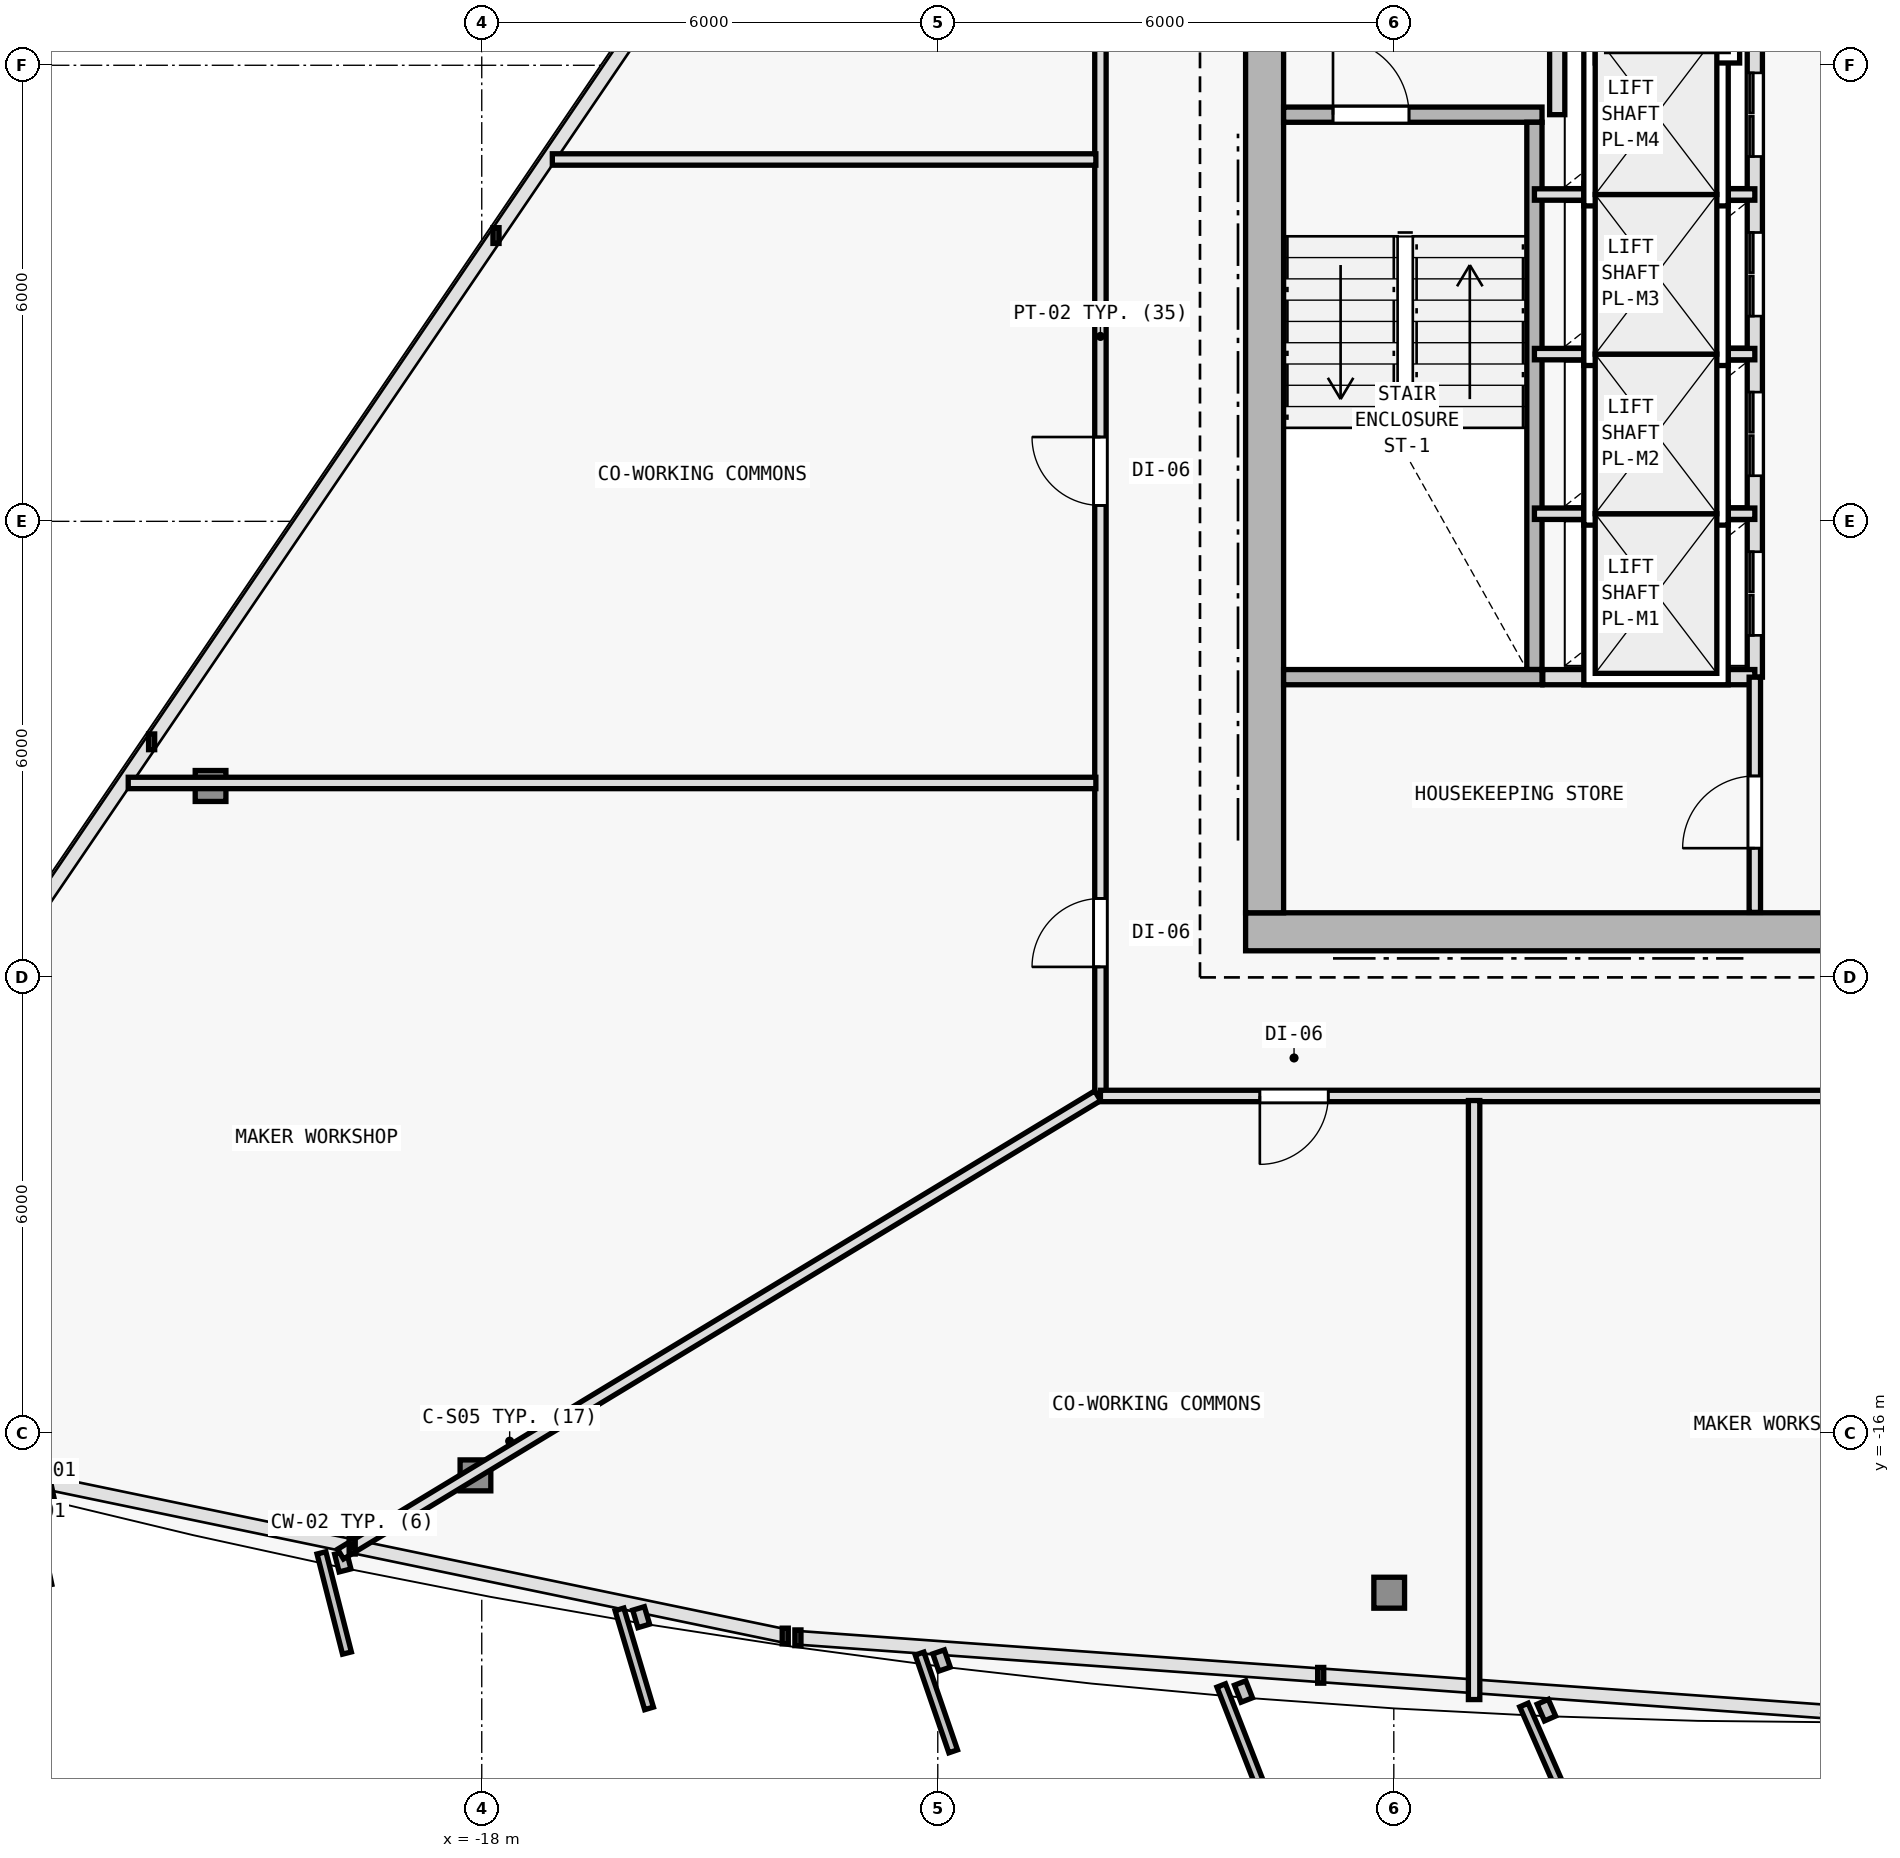
"""IFC4 building model, lengths in metres.
Left out: names, types, materials, properties, quantities, classifications, styles, units other than length and angle.
Written with IfcOpenShell. Run it as: python <this file> out.ifc"""

import sys

from ifc_helpers import new_model, si_unit, direction, frame, frame_2d, origin, origin_2d, place, context, subcontext, project, spatial, rectangle, i_section, extrude, element, fill, save


model = new_model("IFC4")
c1 = context("Model", 3, precision=1e-05, world=origin(), true_north=direction((0.0, 1.0)))
c2 = subcontext(c1, "Body", "Model", "MODEL_VIEW")
j1 = project(units=[si_unit("LENGTHUNIT", "METRE"), si_unit("PLANEANGLEUNIT", "RADIAN")], contexts=[c1])
p1 = place(None, origin())
s1 = spatial("IfcSite", under=j1, at=p1, CompositionType="ELEMENT")
p2 = place(p1, origin())
s2 = spatial("IfcBuilding", under=s1, at=p2, CompositionType="ELEMENT")
p3 = place(p2, frame((0.0, 0.0, 142.2)))
s3 = spatial("IfcBuildingStorey", under=s2, at=p3, CompositionType="ELEMENT", Elevation=142.2)
for number, where, z_axis, x_axis in (
    (1, (-7.7, -9.4, 0.0), (0.0, 0.0, 1.0), (1.0, 0.0, 0.0)),
    (2, (-7.7, 2.0, 0.0), (0.0, 0.0, 1.0), (1.0, 0.0, 0.0)),
):
    element("IfcColumn", number, at=place(p3, frame(where, z_axis=z_axis, x_axis=x_axis)), inside=s3, PredefinedType="COLUMN", context=c2, shape_type="SweptSolid", body=[
        extrude(i_section(OverallWidth=0.404, OverallDepth=0.407, WebThickness=0.017, FlangeThickness=0.028, FilletRadius=0.015, at=origin_2d()), origin(), (0.0, 0.0, 1.0), 3.6),
    ])
p4 = place(p3, frame((-18.083, -16.552, 0.006), z_axis=(0.021139215222, 0.034393707082, 0.999184770947), x_axis=(-0.851947232707, 0.52362764698, 0.0)))
e3 = element("IfcColumn", 3, at=p4, inside=s3, PredefinedType="COLUMN", context=c2, shape_type="SweptSolid", body=[
    extrude(i_section(OverallWidth=0.404, OverallDepth=0.407, WebThickness=0.017, FlangeThickness=0.028, FilletRadius=0.015, at=origin_2d()), origin(), (0.0, 0.0, 1.0), 3.592),
])
p5 = place(p3, frame((-6.061, -18.095, 0.006), z_axis=(0.007137984635, 0.036233769623, 0.999317848892), x_axis=(-0.981142984211, 0.193283327096, 0.0)))
e4 = element("IfcColumn", 4, at=p5, inside=s3, PredefinedType="COLUMN", context=c2, shape_type="SweptSolid", body=[
    extrude(i_section(OverallWidth=0.404, OverallDepth=0.407, WebThickness=0.017, FlangeThickness=0.028, FilletRadius=0.015, at=origin_2d()), origin(), (0.0, 0.0, 1.0), 3.591),
])
p6 = place(p3, frame((-21.568, -7.482, 0.006), z_axis=(0.025971243376, 0.022163940683, 0.999416957156), x_axis=(-0.649149996291, 0.760660425102, 0.0)))
e5 = element("IfcColumn", 5, at=p6, inside=s3, PredefinedType="COLUMN", context=c2, shape_type="SweptSolid", body=[
    extrude(i_section(OverallWidth=0.404, OverallDepth=0.407, WebThickness=0.017, FlangeThickness=0.028, FilletRadius=0.015, at=origin_2d()), origin(), (0.0, 0.0, 1.0), 3.591),
])
p7 = place(p3, frame((-7.95, -9.4, 0.0), z_axis=(0.0, 0.0, 1.0), x_axis=(1.0, 0.0, 0.0)))
e6 = element("IfcWall", 6, at=p7, inside=s3, PredefinedType="SHEAR", context=c2, shape_type="SweptSolid", body=[
    extrude(rectangle(XDim=15.9, YDim=0.5, at=frame_2d((7.95, 0.0))), origin(), (0.0, 0.0, 1.0), 3.35),
])
p8 = place(p7, frame((9.6, 0.0, 0.0)))
e7 = element("IfcOpeningElement", 7, at=p8, cuts=e6, PredefinedType="OPENING", context=c2, shape_type="SweptSolid", body=[
    extrude(rectangle(XDim=1.5, YDim=2.2, at=frame_2d((0.75, 1.1))), frame((0.0, 0.26, 0.0), z_axis=(0.0, -1.0, 0.0), x_axis=(1.0, 0.0, 0.0)), (0.0, 0.0, 1.0), 0.52),
])
p9 = place(p3, frame((-7.7, -9.15, 0.0), z_axis=(0.0, 0.0, 1.0), x_axis=(0.0, 1.0, 0.0)))
e8 = element("IfcWall", 8, at=p9, inside=s3, PredefinedType="SHEAR", context=c2, shape_type="SweptSolid", body=[
    extrude(rectangle(XDim=19.1, YDim=0.5, at=frame_2d((9.55, 0.0))), origin(), (0.0, 0.0, 1.0), 3.35),
])
p10 = place(p9, frame((12.7, 0.0, 0.0)))
e9 = element("IfcOpeningElement", 9, at=p10, cuts=e8, PredefinedType="OPENING", context=c2, shape_type="SweptSolid", body=[
    extrude(rectangle(XDim=1.1, YDim=2.15, at=frame_2d((0.55, 1.075))), frame((0.0, 0.26, 0.0), z_axis=(0.0, -1.0, 0.0), x_axis=(1.0, 0.0, 0.0)), (0.0, 0.0, 1.0), 0.52),
])
p11 = place(p3, frame((-7.45, 1.35, 0.0), z_axis=(0.0, 0.0, 1.0), x_axis=(1.0, 0.0, 0.0)))
e10 = element("IfcWall", 10, at=p11, inside=s3, PredefinedType="SOLIDWALL", context=c2, shape_type="SweptSolid", body=[
    extrude(rectangle(XDim=3.4, YDim=0.2, at=frame_2d((1.7, 0.0))), origin(), (0.0, 0.0, 1.0), 3.35),
])
p12 = place(p11, frame((0.65, 0.0, 0.0)))
e11 = element("IfcOpeningElement", 11, at=p12, cuts=e10, PredefinedType="OPENING", context=c2, shape_type="SweptSolid", body=[
    extrude(rectangle(XDim=1.0, YDim=2.15, at=frame_2d((0.5, 1.075))), frame((0.0, 0.11, 0.0), z_axis=(0.0, -1.0, 0.0), x_axis=(1.0, 0.0, 0.0)), (0.0, 0.0, 1.0), 0.22),
])
p13 = place(p3, frame((-4.15, -5.95, 0.0), z_axis=(0.0, 0.0, 1.0), x_axis=(0.0, 1.0, 0.0)))
e12 = element("IfcWall", 12, at=p13, inside=s3, PredefinedType="SOLIDWALL", context=c2, shape_type="SweptSolid", body=[
    extrude(rectangle(XDim=7.2, YDim=0.2, at=frame_2d((3.6, 0.0))), origin(), (0.0, 0.0, 1.0), 3.35),
])
p14 = place(p3, frame((-3.85, 1.35, 0.0), z_axis=(0.0, 0.0, 1.0), x_axis=(0.0, 1.0, 0.0)))
e13 = element("IfcWall", 13, at=p14, inside=s3, PredefinedType="SOLIDWALL", context=c2, shape_type="SweptSolid", body=[
    extrude(rectangle(XDim=8.595, YDim=0.2, at=frame_2d((4.297, 0.0))), origin(), (0.0, 0.0, 1.0), 3.35),
])
p15 = place(p14, frame((1.5, 0.0, 0.0)))
e14 = element("IfcOpeningElement", 14, at=p15, cuts=e13, PredefinedType="OPENING", context=c2, shape_type="SweptSolid", body=[
    extrude(rectangle(XDim=1.0, YDim=2.15, at=frame_2d((0.5, 1.075))), frame((0.0, 0.11, 0.0), z_axis=(0.0, -1.0, 0.0), x_axis=(1.0, 0.0, 0.0)), (0.0, 0.0, 1.0), 0.22),
])
p16 = place(p14, frame((3.18, 0.0, 0.0)))
e15 = element("IfcOpeningElement", 15, at=p16, cuts=e13, PredefinedType="OPENING", context=c2, shape_type="SweptSolid", body=[
    extrude(rectangle(XDim=1.0, YDim=2.15, at=frame_2d((0.5, 1.075))), frame((0.0, 0.11, 0.0), z_axis=(0.0, -1.0, 0.0), x_axis=(1.0, 0.0, 0.0)), (0.0, 0.0, 1.0), 0.22),
])
p17 = place(p3, frame((-1.25, -6.05, 0.0), z_axis=(0.0, 0.0, 1.0), x_axis=(0.0, 1.0, 0.0)))
e16 = element("IfcWall", 16, at=p17, inside=s3, PredefinedType="SOLIDWALL", context=c2, shape_type="SweptSolid", body=[
    extrude(rectangle(XDim=8.7, YDim=0.2, at=frame_2d((4.35, 0.0))), origin(), (0.0, 0.0, 1.0), 3.35),
])
p18 = place(p17, frame((0.55, 0.0, 0.0)))
e17 = element("IfcOpeningElement", 17, at=p18, cuts=e16, PredefinedType="OPENING", context=c2, shape_type="SweptSolid", body=[
    extrude(rectangle(XDim=1.1, YDim=2.15, at=frame_2d((0.55, 1.075))), frame((0.0, 0.11, 0.0), z_axis=(0.0, -1.0, 0.0), x_axis=(1.0, 0.0, 0.0)), (0.0, 0.0, 1.0), 0.22),
])
p19 = place(p17, frame((2.65, 0.0, 0.0)))
e18 = element("IfcOpeningElement", 18, at=p19, cuts=e16, PredefinedType="OPENING", context=c2, shape_type="SweptSolid", body=[
    extrude(rectangle(XDim=1.1, YDim=2.15, at=frame_2d((0.55, 1.075))), frame((0.0, 0.11, 0.0), z_axis=(0.0, -1.0, 0.0), x_axis=(1.0, 0.0, 0.0)), (0.0, 0.0, 1.0), 0.22),
])
p20 = place(p17, frame((4.75, 0.0, 0.0)))
e19 = element("IfcOpeningElement", 19, at=p20, cuts=e16, PredefinedType="OPENING", context=c2, shape_type="SweptSolid", body=[
    extrude(rectangle(XDim=1.1, YDim=2.15, at=frame_2d((0.55, 1.075))), frame((0.0, 0.11, 0.0), z_axis=(0.0, -1.0, 0.0), x_axis=(1.0, 0.0, 0.0)), (0.0, 0.0, 1.0), 0.22),
])
p21 = place(p17, frame((6.85, 0.0, 0.0)))
e20 = element("IfcOpeningElement", 20, at=p21, cuts=e16, PredefinedType="OPENING", context=c2, shape_type="SweptSolid", body=[
    extrude(rectangle(XDim=1.1, YDim=2.15, at=frame_2d((0.55, 1.075))), frame((0.0, 0.11, 0.0), z_axis=(0.0, -1.0, 0.0), x_axis=(1.0, 0.0, 0.0)), (0.0, 0.0, 1.0), 0.22),
])
for number, where, z_axis, x_axis in (
    (21, (-4.15, -3.9, 0.0), (0.0, 0.0, 1.0), (1.0, 0.0, 0.0)),
    (22, (-4.15, -1.8, 0.0), (0.0, 0.0, 1.0), (1.0, 0.0, 0.0)),
    (23, (-4.15, 0.3, 0.0), (0.0, 0.0, 1.0), (1.0, 0.0, 0.0)),
):
    element("IfcWall", number, at=place(p3, frame(where, z_axis=z_axis, x_axis=x_axis)), inside=s3, PredefinedType="PARTITIONING", context=c2, shape_type="SweptSolid", body=[
        extrude(rectangle(XDim=2.9, YDim=0.15, at=frame_2d((1.45, 0.0))), origin(), (0.0, 0.0, 1.0), 3.35),
    ])
p22 = place(p3, frame((-7.45, -6.05, 0.0), z_axis=(0.0, 0.0, 1.0), x_axis=(1.0, 0.0, 0.0)))
e24 = element("IfcWall", 24, at=p22, inside=s3, PredefinedType="SOLIDWALL", context=c2, shape_type="SweptSolid", body=[
    extrude(rectangle(XDim=3.4, YDim=0.2, at=frame_2d((1.7, 0.0))), origin(), (0.0, 0.0, 1.0), 3.35),
])
p23 = place(p3, frame((-4.04, -6.05, 0.0), z_axis=(0.0, 0.0, 1.0), x_axis=(1.0, 0.0, 0.0)))
e25 = element("IfcWall", 25, at=p23, inside=s3, PredefinedType="SOLIDWALL", context=c2, shape_type="SweptSolid", body=[
    extrude(rectangle(XDim=2.79, YDim=0.2, at=frame_2d((1.395, 0.0))), origin(), (0.0, 0.0, 1.0), 3.35),
])
p24 = place(p3, frame((-1.25, -9.145, 0.0), z_axis=(0.0, 0.0, 1.0), x_axis=(0.0, 1.0, 0.0)))
e26 = element("IfcWall", 26, at=p24, inside=s3, PredefinedType="PARTITIONING", context=c2, shape_type="SweptSolid", body=[
    extrude(rectangle(XDim=3.095, YDim=0.15, at=frame_2d((1.547, 0.0))), origin(), (0.0, 0.0, 1.0), 3.35),
])
p25 = place(p24, frame((0.845, 0.0, 0.0)))
e27 = element("IfcOpeningElement", 27, at=p25, cuts=e26, PredefinedType="OPENING", context=c2, shape_type="SweptSolid", body=[
    extrude(rectangle(XDim=0.95, YDim=2.1, at=frame_2d((0.475, 1.05))), frame((0.0, 0.085, 0.0), z_axis=(0.0, -1.0, 0.0), x_axis=(1.0, 0.0, 0.0)), (0.0, 0.0, 1.0), 0.17),
])
p26 = place(p3, frame((-9.86, -11.56, 0.0), z_axis=(0.0, 0.0, 1.0), x_axis=(0.0, 1.0, 0.0)))
e28 = element("IfcWall", 28, at=p26, inside=s3, PredefinedType="PARTITIONING", context=c2, shape_type="SweptSolid", body=[
    extrude(rectangle(XDim=19.986, YDim=0.15, at=frame_2d((9.993, 0.0))), origin(), (0.0, 0.0, 1.0), 2.775),
])
p27 = place(p26, frame((7.769, 0.0, 0.0)))
e29 = element("IfcOpeningElement", 29, at=p27, cuts=e28, PredefinedType="OPENING", context=c2, shape_type="SweptSolid", body=[
    extrude(rectangle(XDim=0.9, YDim=2.1, at=frame_2d((0.45, 1.05))), frame((0.0, 0.085, 0.0), z_axis=(0.0, -1.0, 0.0), x_axis=(1.0, 0.0, 0.0)), (0.0, 0.0, 1.0), 0.17),
])
p28 = place(p26, frame((1.698, 0.0, 0.0)))
e30 = element("IfcOpeningElement", 30, at=p28, cuts=e28, PredefinedType="OPENING", context=c2, shape_type="SweptSolid", body=[
    extrude(rectangle(XDim=0.9, YDim=2.1, at=frame_2d((0.45, 1.05))), frame((0.0, 0.085, 0.0), z_axis=(0.0, -1.0, 0.0), x_axis=(1.0, 0.0, 0.0)), (0.0, 0.0, 1.0), 0.17),
])
p29 = place(p26, frame((15.614, 0.0, 0.0)))
e31 = element("IfcOpeningElement", 31, at=p29, cuts=e28, PredefinedType="OPENING", context=c2, shape_type="SweptSolid", body=[
    extrude(rectangle(XDim=0.9, YDim=2.1, at=frame_2d((0.45, 1.05))), frame((0.0, 0.085, 0.0), z_axis=(0.0, -1.0, 0.0), x_axis=(1.0, 0.0, 0.0)), (0.0, 0.0, 1.0), 0.17),
])
p30 = place(p3, frame((13.18, -11.56, 0.0), z_axis=(0.0, 0.0, 1.0), x_axis=(-1.0, 0.0, 0.0)))
e32 = element("IfcWall", 32, at=p30, inside=s3, PredefinedType="PARTITIONING", context=c2, shape_type="SweptSolid", body=[
    extrude(rectangle(XDim=23.04, YDim=0.15, at=frame_2d((11.52, 0.0))), origin(), (0.0, 0.0, 1.0), 2.775),
])
p31 = place(p30, frame((20.042, 0.0, 0.0)))
e33 = element("IfcOpeningElement", 33, at=p31, cuts=e32, PredefinedType="OPENING", context=c2, shape_type="SweptSolid", body=[
    extrude(rectangle(XDim=0.9, YDim=2.1, at=frame_2d((0.45, 1.05))), frame((0.0, 0.085, 0.0), z_axis=(0.0, -1.0, 0.0), x_axis=(1.0, 0.0, 0.0)), (0.0, 0.0, 1.0), 0.17),
])
p32 = place(p30, frame((12.178, 0.0, 0.0)))
e34 = element("IfcOpeningElement", 34, at=p32, cuts=e32, PredefinedType="OPENING", context=c2, shape_type="SweptSolid", body=[
    extrude(rectangle(XDim=0.9, YDim=2.1, at=frame_2d((0.45, 1.05))), frame((0.0, 0.085, 0.0), z_axis=(0.0, -1.0, 0.0), x_axis=(1.0, 0.0, 0.0)), (0.0, 0.0, 1.0), 0.17),
])
p33 = place(p30, frame((3.205, 0.0, 0.0)))
e35 = element("IfcOpeningElement", 35, at=p33, cuts=e32, PredefinedType="OPENING", context=c2, shape_type="SweptSolid", body=[
    extrude(rectangle(XDim=0.9, YDim=2.1, at=frame_2d((0.45, 1.05))), frame((0.0, 0.085, 0.0), z_axis=(0.0, -1.0, 0.0), x_axis=(1.0, 0.0, 0.0)), (0.0, 0.0, 1.0), 0.17),
])
p34 = place(p3, frame((-9.896, -11.558, 0.0), z_axis=(0.0, 0.0, 1.0), x_axis=(-0.855495923948, -0.517809544243, 0.0)))
e36 = element("IfcWall", 36, at=p34, inside=s3, PredefinedType="PARTITIONING", context=c2, shape_type="SweptSolid", body=[
    extrude(rectangle(XDim=11.644, YDim=0.15, at=frame_2d((5.822, 0.0))), origin(), (0.0, 0.0, 1.0), 2.775),
])
p35 = place(p3, frame((-9.92, -7.442, 0.0), z_axis=(0.0, 0.0, 1.0), x_axis=(-1.0, 0.0, 0.0)))
e37 = element("IfcWall", 37, at=p35, inside=s3, PredefinedType="PARTITIONING", context=c2, shape_type="SweptSolid", body=[
    extrude(rectangle(XDim=12.731, YDim=0.15, at=frame_2d((6.366, 0.0))), origin(), (0.0, 0.0, 1.0), 2.775),
])
p36 = place(p3, frame((-9.92, 0.76, 0.0), z_axis=(0.0, 0.0, 1.0), x_axis=(-1.0, 0.0, 0.0)))
e38 = element("IfcWall", 38, at=p36, inside=s3, PredefinedType="PARTITIONING", context=c2, shape_type="SweptSolid", body=[
    extrude(rectangle(XDim=7.151, YDim=0.15, at=frame_2d((3.576, 0.0))), origin(), (0.0, 0.0, 1.0), 2.825),
])
p37 = place(p3, frame((-4.944, -11.62, 0.0), z_axis=(0.0, 0.0, 1.0), x_axis=(0.0, -1.0, 0.0)))
e39 = element("IfcWall", 39, at=p37, inside=s3, PredefinedType="PARTITIONING", context=c2, shape_type="SweptSolid", body=[
    extrude(rectangle(XDim=7.881, YDim=0.15, at=frame_2d((3.94, 0.0))), origin(), (0.0, 0.0, 1.0), 2.825),
])
p38 = place(p12, origin())
e40 = element("IfcDoor", 40, at=p38, inside=s3, OperationType="SINGLE_SWING_LEFT", PredefinedType="DOOR", context=c2, shape_type="SweptSolid", body=[
    extrude(rectangle(XDim=1.0, YDim=2.15, at=frame_2d((0.5, 1.075))), frame((0.0, 0.025, 0.0), z_axis=(0.0, -1.0, 0.0), x_axis=(1.0, 0.0, 0.0)), (0.0, 0.0, 1.0), 0.05),
])
fill(e11, e40)
p39 = place(p18, origin())
e41 = element("IfcDoor", 41, at=p39, inside=s3, OperationType="DOUBLE_DOOR_SLIDING", PredefinedType="DOOR", context=c2, shape_type="SweptSolid", body=[
    extrude(rectangle(XDim=1.1, YDim=2.15, at=frame_2d((0.55, 1.075))), frame((0.0, 0.025, 0.0), z_axis=(0.0, -1.0, 0.0), x_axis=(1.0, 0.0, 0.0)), (0.0, 0.0, 1.0), 0.05),
])
fill(e17, e41)
p40 = place(p19, origin())
e42 = element("IfcDoor", 42, at=p40, inside=s3, OperationType="DOUBLE_DOOR_SLIDING", PredefinedType="DOOR", context=c2, shape_type="SweptSolid", body=[
    extrude(rectangle(XDim=1.1, YDim=2.15, at=frame_2d((0.55, 1.075))), frame((0.0, 0.025, 0.0), z_axis=(0.0, -1.0, 0.0), x_axis=(1.0, 0.0, 0.0)), (0.0, 0.0, 1.0), 0.05),
])
fill(e18, e42)
p41 = place(p20, origin())
e43 = element("IfcDoor", 43, at=p41, inside=s3, OperationType="DOUBLE_DOOR_SLIDING", PredefinedType="DOOR", context=c2, shape_type="SweptSolid", body=[
    extrude(rectangle(XDim=1.1, YDim=2.15, at=frame_2d((0.55, 1.075))), frame((0.0, 0.025, 0.0), z_axis=(0.0, -1.0, 0.0), x_axis=(1.0, 0.0, 0.0)), (0.0, 0.0, 1.0), 0.05),
])
fill(e19, e43)
p42 = place(p21, origin())
e44 = element("IfcDoor", 44, at=p42, inside=s3, OperationType="DOUBLE_DOOR_SLIDING", PredefinedType="DOOR", context=c2, shape_type="SweptSolid", body=[
    extrude(rectangle(XDim=1.1, YDim=2.15, at=frame_2d((0.55, 1.075))), frame((0.0, 0.025, 0.0), z_axis=(0.0, -1.0, 0.0), x_axis=(1.0, 0.0, 0.0)), (0.0, 0.0, 1.0), 0.05),
])
fill(e20, e44)
p43 = place(p25, origin())
e45 = element("IfcDoor", 45, at=p43, inside=s3, OperationType="SINGLE_SWING_LEFT", PredefinedType="DOOR", context=c2, shape_type="SweptSolid", body=[
    extrude(rectangle(XDim=0.95, YDim=2.1, at=frame_2d((0.475, 1.05))), frame((0.0, 0.025, 0.0), z_axis=(0.0, -1.0, 0.0), x_axis=(1.0, 0.0, 0.0)), (0.0, 0.0, 1.0), 0.05),
])
fill(e27, e45)
p44 = place(p27, origin())
e46 = element("IfcDoor", 46, at=p44, inside=s3, OperationType="SINGLE_SWING_RIGHT", PredefinedType="DOOR", context=c2, shape_type="SweptSolid", body=[
    extrude(rectangle(XDim=0.9, YDim=2.1, at=frame_2d((0.45, 1.05))), frame((0.0, 0.025, 0.0), z_axis=(0.0, -1.0, 0.0), x_axis=(1.0, 0.0, 0.0)), (0.0, 0.0, 1.0), 0.05),
])
fill(e29, e46)
p45 = place(p28, origin())
e47 = element("IfcDoor", 47, at=p45, inside=s3, OperationType="SINGLE_SWING_LEFT", PredefinedType="DOOR", context=c2, shape_type="SweptSolid", body=[
    extrude(rectangle(XDim=0.9, YDim=2.1, at=frame_2d((0.45, 1.05))), frame((0.0, 0.025, 0.0), z_axis=(0.0, -1.0, 0.0), x_axis=(1.0, 0.0, 0.0)), (0.0, 0.0, 1.0), 0.05),
])
fill(e30, e47)
p46 = place(p31, origin())
e48 = element("IfcDoor", 48, at=p46, inside=s3, OperationType="SINGLE_SWING_RIGHT", PredefinedType="DOOR", context=c2, shape_type="SweptSolid", body=[
    extrude(rectangle(XDim=0.9, YDim=2.1, at=frame_2d((0.45, 1.05))), frame((0.0, 0.025, 0.0), z_axis=(0.0, -1.0, 0.0), x_axis=(1.0, 0.0, 0.0)), (0.0, 0.0, 1.0), 0.05),
])
fill(e33, e48)
save(model, sys.argv[1])
